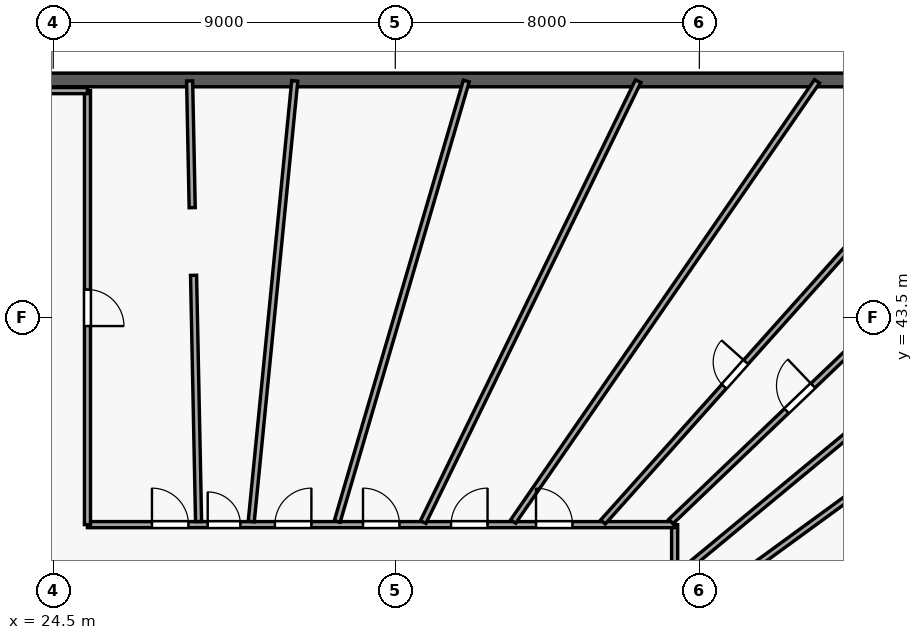
"""IFC4 building model, lengths in metres.
Left out: names, types, materials, properties, quantities, classifications, styles, units other than length and angle.
Written with IfcOpenShell. Run it as: python <this file> out.ifc"""

import sys

from ifc_helpers import new_model, si_unit, direction, frame, frame_2d, origin, origin_with_axes, origin_2d, place, context, subcontext, project, spatial, rectangle, circle, extrude, source, transform, mapped, element, fill, save


model = new_model("IFC4")
c1 = context("Model", 3, precision=1e-05, world=origin(), true_north=direction((0.0, 1.0)))
c2 = subcontext(c1, "Body", "Model", "MODEL_VIEW")
j1 = project(units=[si_unit("LENGTHUNIT", "METRE"), si_unit("PLANEANGLEUNIT", "RADIAN")], contexts=[c1])
p1 = place(None, origin())
s1 = spatial("IfcSite", under=j1, at=p1, CompositionType="ELEMENT")
p2 = place(p1, origin())
s2 = spatial("IfcBuilding", under=s1, at=p2, CompositionType="ELEMENT")
p3 = place(p2, frame((0.0, 0.0, 9.0)))
s3 = spatial("IfcBuildingStorey", under=s2, at=p3, CompositionType="ELEMENT", Elevation=9.0)
m1 = source(origin_with_axes(), c2, "Body", "SweptSolid", [
    extrude(circle(Radius=0.8, at=origin_2d()), origin(), (0.0, 0.0, 1.0), 4.5),
])
p4 = place(p3, frame((28.5, 45.5, 0.0), z_axis=(0.0, 0.0, 1.0), x_axis=(1.0, 0.0, 0.0)))
e1 = element("IfcColumn", 1, at=p4, inside=s3, PredefinedType="COLUMN", context=c2, shape_type="MappedRepresentation", body=[
    mapped(m1, transform((0.0, 0.0, 0.0), scale=1.0)),
])
p5 = place(p3, frame((54.6, 49.75, 0.0), z_axis=(0.0, 0.0, 1.0), x_axis=(-1.0, 0.0, 0.0)))
e2 = element("IfcWall", 2, at=p5, inside=s3, PredefinedType="SOLIDWALL", context=c2, shape_type="SweptSolid", body=[
    extrude(rectangle(XDim=49.25, YDim=0.36, at=frame_2d((24.625, 0.0))), origin(), (0.0, 0.0, 1.0), 4.2),
])
p6 = place(p5, frame((1.866, 0.0, 0.85)))
e3 = element("IfcOpeningElement", 3, at=p6, cuts=e2, PredefinedType="OPENING", context=c2, shape_type="SweptSolid", body=[
    extrude(rectangle(XDim=1.8, YDim=2.2, at=frame_2d((0.9, 1.1))), frame((0.0, 0.19, 0.0), z_axis=(0.0, -1.0, 0.0), x_axis=(1.0, 0.0, 0.0)), (0.0, 0.0, 1.0), 0.38),
])
p7 = place(p5, frame((6.763, 0.0, 0.85)))
e4 = element("IfcOpeningElement", 4, at=p7, cuts=e2, PredefinedType="OPENING", context=c2, shape_type="SweptSolid", body=[
    extrude(rectangle(XDim=1.8, YDim=2.2, at=frame_2d((0.9, 1.1))), frame((0.0, 0.19, 0.0), z_axis=(0.0, -1.0, 0.0), x_axis=(1.0, 0.0, 0.0)), (0.0, 0.0, 1.0), 0.38),
])
p8 = place(p5, frame((11.474, 0.0, 0.85)))
e5 = element("IfcOpeningElement", 5, at=p8, cuts=e2, PredefinedType="OPENING", context=c2, shape_type="SweptSolid", body=[
    extrude(rectangle(XDim=1.8, YDim=2.2, at=frame_2d((0.9, 1.1))), frame((0.0, 0.19, 0.0), z_axis=(0.0, -1.0, 0.0), x_axis=(1.0, 0.0, 0.0)), (0.0, 0.0, 1.0), 0.38),
])
p9 = place(p5, frame((16.083, 0.0, 0.85)))
e6 = element("IfcOpeningElement", 6, at=p9, cuts=e2, PredefinedType="OPENING", context=c2, shape_type="SweptSolid", body=[
    extrude(rectangle(XDim=1.8, YDim=2.2, at=frame_2d((0.9, 1.1))), frame((0.0, 0.19, 0.0), z_axis=(0.0, -1.0, 0.0), x_axis=(1.0, 0.0, 0.0)), (0.0, 0.0, 1.0), 0.38),
])
p10 = place(p5, frame((20.595, 0.0, 0.85)))
e7 = element("IfcOpeningElement", 7, at=p10, cuts=e2, PredefinedType="OPENING", context=c2, shape_type="SweptSolid", body=[
    extrude(rectangle(XDim=1.8, YDim=2.2, at=frame_2d((0.9, 1.1))), frame((0.0, 0.19, 0.0), z_axis=(0.0, -1.0, 0.0), x_axis=(1.0, 0.0, 0.0)), (0.0, 0.0, 1.0), 0.38),
])
p11 = place(p5, frame((24.23, 0.0, 0.85)))
e8 = element("IfcOpeningElement", 8, at=p11, cuts=e2, PredefinedType="OPENING", context=c2, shape_type="SweptSolid", body=[
    extrude(rectangle(XDim=1.8, YDim=2.2, at=frame_2d((0.9, 1.1))), frame((0.0, 0.19, 0.0), z_axis=(0.0, -1.0, 0.0), x_axis=(1.0, 0.0, 0.0)), (0.0, 0.0, 1.0), 0.38),
])
p12 = place(p5, frame((30.4, 0.0, 0.85)))
e9 = element("IfcOpeningElement", 9, at=p12, cuts=e2, PredefinedType="OPENING", context=c2, shape_type="SweptSolid", body=[
    extrude(rectangle(XDim=1.8, YDim=2.2, at=frame_2d((0.9, 1.1))), frame((0.0, 0.19, 0.0), z_axis=(0.0, -1.0, 0.0), x_axis=(1.0, 0.0, 0.0)), (0.0, 0.0, 1.0), 0.38),
])
p13 = place(p5, frame((35.42, 0.0, 0.85)))
e10 = element("IfcOpeningElement", 10, at=p13, cuts=e2, PredefinedType="OPENING", context=c2, shape_type="SweptSolid", body=[
    extrude(rectangle(XDim=1.8, YDim=2.2, at=frame_2d((0.9, 1.1))), frame((0.0, 0.19, 0.0), z_axis=(0.0, -1.0, 0.0), x_axis=(1.0, 0.0, 0.0)), (0.0, 0.0, 1.0), 0.38),
])
p14 = place(p5, frame((40.69, 0.0, 0.85)))
e11 = element("IfcOpeningElement", 11, at=p14, cuts=e2, PredefinedType="OPENING", context=c2, shape_type="SweptSolid", body=[
    extrude(rectangle(XDim=1.8, YDim=2.2, at=frame_2d((0.9, 1.1))), frame((0.0, 0.19, 0.0), z_axis=(0.0, -1.0, 0.0), x_axis=(1.0, 0.0, 0.0)), (0.0, 0.0, 1.0), 0.38),
])
p15 = place(p5, frame((45.58, 0.0, 0.85)))
e12 = element("IfcOpeningElement", 12, at=p15, cuts=e2, PredefinedType="OPENING", context=c2, shape_type="SweptSolid", body=[
    extrude(rectangle(XDim=1.8, YDim=2.2, at=frame_2d((0.9, 1.1))), frame((0.0, 0.19, 0.0), z_axis=(0.0, -1.0, 0.0), x_axis=(1.0, 0.0, 0.0)), (0.0, 0.0, 1.0), 0.38),
])
p16 = place(p3, frame((40.932, 36.712, 0.0), z_axis=(0.0, 0.0, 1.0), x_axis=(0.770350004389, 0.637621259635, 0.0)))
e13 = element("IfcWall", 13, at=p16, inside=s3, PredefinedType="PARTITIONING", context=c2, shape_type="SweptSolid", body=[
    extrude(rectangle(XDim=18.942, YDim=0.16, at=frame_2d((9.471, 0.0))), origin(), (0.0, 0.0, 1.0), 4.2),
])
p17 = place(p16, frame((8.979, 0.0, 0.0)))
e14 = element("IfcOpeningElement", 14, at=p17, cuts=e13, PredefinedType="OPENING", context=c2, shape_type="SweptSolid", body=[
    extrude(rectangle(XDim=0.96, YDim=2.15, at=frame_2d((0.48, 1.075))), frame((0.0, 0.09, 0.0), z_axis=(0.0, -1.0, 0.0), x_axis=(1.0, 0.0, 0.0)), (0.0, 0.0, 1.0), 0.18),
])
p18 = place(p3, frame((40.932, 35.49, 0.0), z_axis=(0.0, 0.0, 1.0), x_axis=(0.808014689356, 0.589162339076, 0.0)))
e15 = element("IfcWall", 15, at=p18, inside=s3, PredefinedType="PARTITIONING", context=c2, shape_type="SweptSolid", body=[
    extrude(rectangle(XDim=18.602, YDim=0.16, at=frame_2d((9.301, 0.0))), origin(), (0.0, 0.0, 1.0), 4.2),
])
p19 = place(p18, frame((8.808, 0.0, 0.0)))
e16 = element("IfcOpeningElement", 16, at=p19, cuts=e15, PredefinedType="OPENING", context=c2, shape_type="SweptSolid", body=[
    extrude(rectangle(XDim=0.96, YDim=2.15, at=frame_2d((0.48, 1.075))), frame((0.0, 0.09, 0.0), z_axis=(0.0, -1.0, 0.0), x_axis=(1.0, 0.0, 0.0)), (0.0, 0.0, 1.0), 0.18),
])
p20 = place(p3, frame((40.85, 38.05, 0.0), z_axis=(0.0, 0.0, 1.0), x_axis=(0.0, -1.0, 0.0)))
e17 = element("IfcWall", 17, at=p20, inside=s3, PredefinedType="PARTITIONING", context=c2, shape_type="SweptSolid", body=[
    extrude(rectangle(XDim=18.508, YDim=0.16, at=frame_2d((9.254, 0.0))), origin(), (0.0, 0.0, 1.0), 3.25),
])
p21 = place(p20, frame((13.87, 0.0, 0.0)))
e18 = element("IfcOpeningElement", 18, at=p21, cuts=e17, PredefinedType="OPENING", context=c2, shape_type="SweptSolid", body=[
    extrude(rectangle(XDim=0.96, YDim=2.15, at=frame_2d((0.48, 1.075))), frame((0.0, 0.09, 0.0), z_axis=(0.0, -1.0, 0.0), x_axis=(1.0, 0.0, 0.0)), (0.0, 0.0, 1.0), 0.18),
])
p22 = place(p20, frame((8.695, 0.0, 0.0)))
e19 = element("IfcOpeningElement", 19, at=p22, cuts=e17, PredefinedType="OPENING", context=c2, shape_type="SweptSolid", body=[
    extrude(rectangle(XDim=0.96, YDim=2.15, at=frame_2d((0.48, 1.075))), frame((0.0, 0.09, 0.0), z_axis=(0.0, -1.0, 0.0), x_axis=(1.0, 0.0, 0.0)), (0.0, 0.0, 1.0), 0.18),
])
p23 = place(p20, frame((6.334, 0.0, 0.0)))
e20 = element("IfcOpeningElement", 20, at=p23, cuts=e17, PredefinedType="OPENING", context=c2, shape_type="SweptSolid", body=[
    extrude(rectangle(XDim=0.96, YDim=2.15, at=frame_2d((0.48, 1.075))), frame((0.0, 0.09, 0.0), z_axis=(0.0, -1.0, 0.0), x_axis=(1.0, 0.0, 0.0)), (0.0, 0.0, 1.0), 0.18),
])
p24 = place(p20, frame((12.2, 0.0, 0.0)))
e21 = element("IfcOpeningElement", 21, at=p24, cuts=e17, PredefinedType="OPENING", context=c2, shape_type="SweptSolid", body=[
    extrude(rectangle(XDim=0.96, YDim=2.15, at=frame_2d((0.48, 1.075))), frame((0.0, 0.09, 0.0), z_axis=(0.0, -1.0, 0.0), x_axis=(1.0, 0.0, 0.0)), (0.0, 0.0, 1.0), 0.18),
])
p25 = place(p20, frame((2.76, 0.0, 0.0)))
e22 = element("IfcOpeningElement", 22, at=p25, cuts=e17, PredefinedType="OPENING", context=c2, shape_type="SweptSolid", body=[
    extrude(rectangle(XDim=0.86, YDim=2.04, at=frame_2d((0.43, 1.02))), frame((0.0, 0.09, 0.0), z_axis=(0.0, -1.0, 0.0), x_axis=(1.0, 0.0, 0.0)), (0.0, 0.0, 1.0), 0.18),
])
p26 = place(p20, frame((1.494, 0.0, 0.0)))
e23 = element("IfcOpeningElement", 23, at=p26, cuts=e17, PredefinedType="OPENING", context=c2, shape_type="SweptSolid", body=[
    extrude(rectangle(XDim=0.86, YDim=2.04, at=frame_2d((0.43, 1.02))), frame((0.0, 0.09, 0.0), z_axis=(0.0, -1.0, 0.0), x_axis=(1.0, 0.0, 0.0)), (0.0, 0.0, 1.0), 0.18),
])
p27 = place(p3, frame((40.919, 33.932, 0.0), z_axis=(0.0, 0.0, 1.0), x_axis=(0.855961001887, 0.517040388412, 0.0)))
e24 = element("IfcWall", 24, at=p27, inside=s3, PredefinedType="PARTITIONING", context=c2, shape_type="SweptSolid", body=[
    extrude(rectangle(XDim=17.579, YDim=0.16, at=frame_2d((8.789, 0.0))), origin(), (0.0, 0.0, 1.0), 4.2),
])
p28 = place(p27, frame((8.289, 0.0, 0.0)))
e25 = element("IfcOpeningElement", 25, at=p28, cuts=e24, PredefinedType="OPENING", context=c2, shape_type="SweptSolid", body=[
    extrude(rectangle(XDim=0.96, YDim=2.15, at=frame_2d((0.48, 1.075))), frame((0.0, 0.09, 0.0), z_axis=(0.0, -1.0, 0.0), x_axis=(1.0, 0.0, 0.0)), (0.0, 0.0, 1.0), 0.18),
])
p29 = place(p3, frame((40.919, 32.827, 0.0), z_axis=(0.0, 0.0, 1.0), x_axis=(0.8890624387, 0.457785954452, 0.0)))
e26 = element("IfcWall", 26, at=p29, inside=s3, PredefinedType="PARTITIONING", context=c2, shape_type="SweptSolid", body=[
    extrude(rectangle(XDim=16.927, YDim=0.16, at=frame_2d((8.464, 0.0))), origin(), (0.0, 0.0, 1.0), 4.2),
])
p30 = place(p29, frame((8.033, 0.0, 0.0)))
e27 = element("IfcOpeningElement", 27, at=p30, cuts=e26, PredefinedType="OPENING", context=c2, shape_type="SweptSolid", body=[
    extrude(rectangle(XDim=0.86, YDim=2.04, at=frame_2d((0.43, 1.02))), frame((0.0, 0.09, 0.0), z_axis=(0.0, -1.0, 0.0), x_axis=(1.0, 0.0, 0.0)), (0.0, 0.0, 1.0), 0.18),
])
p31 = place(p3, frame((40.932, 31.951, 0.0), z_axis=(0.0, 0.0, 1.0), x_axis=(0.914043329039, 0.405616558636, 0.0)))
e28 = element("IfcWall", 28, at=p31, inside=s3, PredefinedType="PARTITIONING", context=c2, shape_type="SweptSolid", body=[
    extrude(rectangle(XDim=16.452, YDim=0.16, at=frame_2d((8.226, 0.0))), origin(), (0.0, 0.0, 1.0), 4.2),
])
p32 = place(p31, frame((7.733, 0.0, 0.0)))
e29 = element("IfcOpeningElement", 29, at=p32, cuts=e28, PredefinedType="OPENING", context=c2, shape_type="SweptSolid", body=[
    extrude(rectangle(XDim=0.96, YDim=2.15, at=frame_2d((0.48, 1.075))), frame((0.0, 0.09, 0.0), z_axis=(0.0, -1.0, 0.0), x_axis=(1.0, 0.0, 0.0)), (0.0, 0.0, 1.0), 0.18),
])
p33 = place(p3, frame((25.4, 38.05, 0.0), z_axis=(0.0, 0.0, 1.0), x_axis=(1.0, 0.0, 0.0)))
e30 = element("IfcWall", 30, at=p33, inside=s3, PredefinedType="PARTITIONING", context=c2, shape_type="SweptSolid", body=[
    extrude(rectangle(XDim=15.45, YDim=0.16, at=frame_2d((7.725, 0.0))), origin(), (0.0, 0.0, 1.0), 4.2),
])
p34 = place(p33, frame((11.802, 0.0, 0.0)))
e31 = element("IfcOpeningElement", 31, at=p34, cuts=e30, PredefinedType="OPENING", context=c2, shape_type="SweptSolid", body=[
    extrude(rectangle(XDim=0.96, YDim=2.15, at=frame_2d((0.48, 1.075))), frame((0.0, 0.09, 0.0), z_axis=(0.0, -1.0, 0.0), x_axis=(1.0, 0.0, 0.0)), (0.0, 0.0, 1.0), 0.18),
])
p35 = place(p33, frame((9.567, 0.0, 0.0)))
e32 = element("IfcOpeningElement", 32, at=p35, cuts=e30, PredefinedType="OPENING", context=c2, shape_type="SweptSolid", body=[
    extrude(rectangle(XDim=0.96, YDim=2.15, at=frame_2d((0.48, 1.075))), frame((0.0, 0.09, 0.0), z_axis=(0.0, -1.0, 0.0), x_axis=(1.0, 0.0, 0.0)), (0.0, 0.0, 1.0), 0.18),
])
p36 = place(p33, frame((7.25, 0.0, 0.0)))
e33 = element("IfcOpeningElement", 33, at=p36, cuts=e30, PredefinedType="OPENING", context=c2, shape_type="SweptSolid", body=[
    extrude(rectangle(XDim=0.96, YDim=2.15, at=frame_2d((0.48, 1.075))), frame((0.0, 0.09, 0.0), z_axis=(0.0, -1.0, 0.0), x_axis=(1.0, 0.0, 0.0)), (0.0, 0.0, 1.0), 0.18),
])
p37 = place(p33, frame((4.933, 0.0, 0.0)))
e34 = element("IfcOpeningElement", 34, at=p37, cuts=e30, PredefinedType="OPENING", context=c2, shape_type="SweptSolid", body=[
    extrude(rectangle(XDim=0.96, YDim=2.15, at=frame_2d((0.48, 1.075))), frame((0.0, 0.09, 0.0), z_axis=(0.0, -1.0, 0.0), x_axis=(1.0, 0.0, 0.0)), (0.0, 0.0, 1.0), 0.18),
])
p38 = place(p33, frame((1.698, 0.0, 0.0)))
e35 = element("IfcOpeningElement", 35, at=p38, cuts=e30, PredefinedType="OPENING", context=c2, shape_type="SweptSolid", body=[
    extrude(rectangle(XDim=0.96, YDim=2.15, at=frame_2d((0.48, 1.075))), frame((0.0, 0.09, 0.0), z_axis=(0.0, -1.0, 0.0), x_axis=(1.0, 0.0, 0.0)), (0.0, 0.0, 1.0), 0.18),
])
p39 = place(p33, frame((3.164, 0.0, 0.0)))
e36 = element("IfcOpeningElement", 36, at=p39, cuts=e30, PredefinedType="OPENING", context=c2, shape_type="SweptSolid", body=[
    extrude(rectangle(XDim=0.86, YDim=2.04, at=frame_2d((0.43, 1.02))), frame((0.0, 0.09, 0.0), z_axis=(0.0, -1.0, 0.0), x_axis=(1.0, 0.0, 0.0)), (0.0, 0.0, 1.0), 0.18),
])
p40 = place(p3, frame((36.602, 38.132, 0.0), z_axis=(0.0, 0.0, 1.0), x_axis=(0.568083583137, 0.822970863743, 0.0)))
e37 = element("IfcWall", 37, at=p40, inside=s3, PredefinedType="PARTITIONING", context=c2, shape_type="SweptSolid", body=[
    extrude(rectangle(XDim=14.073, YDim=0.16, at=frame_2d((7.036, 0.0))), origin(), (0.0, 0.0, 1.0), 4.2),
])
p41 = place(p3, frame((34.233, 38.118, 0.0), z_axis=(0.0, 0.0, 1.0), x_axis=(0.438369218091, 0.898794986985, 0.0)))
e38 = element("IfcWall", 38, at=p41, inside=s3, PredefinedType="PARTITIONING", context=c2, shape_type="SweptSolid", body=[
    extrude(rectangle(XDim=12.906, YDim=0.16, at=frame_2d((6.453, 0.0))), origin(), (0.0, 0.0, 1.0), 4.2),
])
p42 = place(p3, frame((31.972, 38.132, 0.0), z_axis=(0.0, 0.0, 1.0), x_axis=(0.281237056868, 0.959638326582, 0.0)))
e39 = element("IfcWall", 39, at=p42, inside=s3, PredefinedType="PARTITIONING", context=c2, shape_type="SweptSolid", body=[
    extrude(rectangle(XDim=12.078, YDim=0.16, at=frame_2d((6.039, 0.0))), origin(), (0.0, 0.0, 1.0), 4.2),
])
p43 = place(p3, frame((29.709, 38.132, 0.0), z_axis=(0.0, 0.0, 1.0), x_axis=(0.098293881021, 0.995157431241, 0.0)))
e40 = element("IfcWall", 40, at=p43, inside=s3, PredefinedType="PARTITIONING", context=c2, shape_type="SweptSolid", body=[
    extrude(rectangle(XDim=11.649, YDim=0.16, at=frame_2d((5.824, 0.0))), origin(), (0.0, 0.0, 1.0), 4.2),
])
p44 = place(p3, frame((25.4, 49.47, 0.0), z_axis=(0.0, 0.0, 1.0), x_axis=(0.0, -1.0, 0.0)))
e41 = element("IfcWall", 41, at=p44, inside=s3, PredefinedType="PARTITIONING", context=c2, shape_type="SweptSolid", body=[
    extrude(rectangle(XDim=11.42, YDim=0.16, at=frame_2d((5.71, 0.0))), origin(), (0.0, 0.0, 1.0), 4.2),
])
p45 = place(p44, frame((5.235, 0.0, 0.0)))
e42 = element("IfcOpeningElement", 42, at=p45, cuts=e41, PredefinedType="OPENING", context=c2, shape_type="SweptSolid", body=[
    extrude(rectangle(XDim=0.96, YDim=2.15, at=frame_2d((0.48, 1.075))), frame((0.0, 0.09, 0.0), z_axis=(0.0, -1.0, 0.0), x_axis=(1.0, 0.0, 0.0)), (0.0, 0.0, 1.0), 0.18),
])
p46 = place(p3, frame((38.966, 38.121, 0.0), z_axis=(0.0, 0.0, 1.0), x_axis=(0.666343454818, 0.745644955875, 0.0)))
e43 = element("IfcWall", 43, at=p46, inside=s3, PredefinedType="PARTITIONING", context=c2, shape_type="SweptSolid", body=[
    extrude(rectangle(XDim=10.421, YDim=0.16, at=frame_2d((5.21, 0.0))), origin(), (0.0, 0.0, 1.0), 4.2),
])
p47 = place(p46, frame((4.781, 0.0, 0.0)))
e44 = element("IfcOpeningElement", 44, at=p47, cuts=e43, PredefinedType="OPENING", context=c2, shape_type="SweptSolid", body=[
    extrude(rectangle(XDim=0.86, YDim=2.04, at=frame_2d((0.43, 1.02))), frame((0.0, 0.09, 0.0), z_axis=(0.0, -1.0, 0.0), x_axis=(1.0, 0.0, 0.0)), (0.0, 0.0, 1.0), 0.18),
])
p48 = place(p3, frame((40.752, 38.132, 0.0), z_axis=(0.0, 0.0, 1.0), x_axis=(0.722765157253, 0.69109371829, 0.0)))
e45 = element("IfcWall", 45, at=p48, inside=s3, PredefinedType="PARTITIONING", context=c2, shape_type="SweptSolid", body=[
    extrude(rectangle(XDim=9.374, YDim=0.16, at=frame_2d((4.687, 0.0))), origin(), (0.0, 0.0, 1.0), 3.25),
])
p49 = place(p48, frame((4.212, 0.0, 0.0)))
e46 = element("IfcOpeningElement", 46, at=p49, cuts=e45, PredefinedType="OPENING", context=c2, shape_type="SweptSolid", body=[
    extrude(rectangle(XDim=0.96, YDim=2.15, at=frame_2d((0.48, 1.075))), frame((0.0, 0.09, 0.0), z_axis=(0.0, -1.0, 0.0), x_axis=(1.0, 0.0, 0.0)), (0.0, 0.0, 1.0), 0.18),
])
p50 = place(p3, frame((28.323, 38.132, 0.0), z_axis=(0.0, 0.0, 1.0), x_axis=(-0.020309370156, 0.999793743471, 0.0)))
e47 = element("IfcWall", 47, at=p50, inside=s3, PredefinedType="PARTITIONING", context=c2, shape_type="SweptSolid", body=[
    extrude(rectangle(XDim=6.479, YDim=0.16, at=frame_2d((3.24, 0.0))), origin(), (0.0, 0.0, 1.0), 3.25),
])
p51 = place(p3, frame((21.2, 49.47, 0.0), z_axis=(0.0, 0.0, 1.0), x_axis=(1.0, 0.0, 0.0)))
e48 = element("IfcWall", 48, at=p51, inside=s3, PredefinedType="PARTITIONING", context=c2, shape_type="SweptSolid", body=[
    extrude(rectangle(XDim=4.2, YDim=0.16, at=frame_2d((2.1, 0.0))), origin(), (0.0, 0.0, 1.0), 4.2),
])
p52 = place(p3, frame((28.156, 46.39, 0.0), z_axis=(0.0, 0.0, 1.0), x_axis=(-0.020345688852, 0.999793005049, 0.0)))
e49 = element("IfcWall", 49, at=p52, inside=s3, PredefinedType="PARTITIONING", context=c2, shape_type="SweptSolid", body=[
    extrude(rectangle(XDim=3.336, YDim=0.16, at=frame_2d((1.668, 0.0))), origin(), (0.0, 0.0, 1.0), 4.2),
])
m2 = source(origin_with_axes(), c2, "Body", "SweptSolid", [
    extrude(rectangle(XDim=1.8, YDim=2.2, at=frame_2d((0.9, 1.1))), frame((0.0, 0.03, 0.0), z_axis=(0.0, -1.0, 0.0), x_axis=(1.0, 0.0, 0.0)), (0.0, 0.0, 1.0), 0.06),
])
p53 = place(p8, origin())
e50 = element("IfcWindow", 50, at=p53, inside=s3, PartitioningType="SINGLE_PANEL", PredefinedType="WINDOW", context=c2, shape_type="MappedRepresentation", body=[
    mapped(m2, transform((0.0, 0.0, 0.0), scale=1.0)),
])
fill(e5, e50)
p54 = place(p9, origin())
e51 = element("IfcWindow", 51, at=p54, inside=s3, PartitioningType="SINGLE_PANEL", PredefinedType="WINDOW", context=c2, shape_type="MappedRepresentation", body=[
    mapped(m2, transform((0.0, 0.0, 0.0), scale=1.0)),
])
fill(e6, e51)
p55 = place(p10, origin())
e52 = element("IfcWindow", 52, at=p55, inside=s3, PartitioningType="SINGLE_PANEL", PredefinedType="WINDOW", context=c2, shape_type="MappedRepresentation", body=[
    mapped(m2, transform((0.0, 0.0, 0.0), scale=1.0)),
])
fill(e7, e52)
p56 = place(p11, origin())
e53 = element("IfcWindow", 53, at=p56, inside=s3, PartitioningType="SINGLE_PANEL", PredefinedType="WINDOW", context=c2, shape_type="MappedRepresentation", body=[
    mapped(m2, transform((0.0, 0.0, 0.0), scale=1.0)),
])
fill(e8, e53)
m3 = source(origin_with_axes(), c2, "Body", "SweptSolid", [
    extrude(rectangle(XDim=0.96, YDim=2.15, at=frame_2d((0.48, 1.075))), frame((0.0, 0.025, 0.0), z_axis=(0.0, -1.0, 0.0), x_axis=(1.0, 0.0, 0.0)), (0.0, 0.0, 1.0), 0.05),
])
p57 = place(p49, origin())
e54 = element("IfcDoor", 54, at=p57, inside=s3, OperationType="SINGLE_SWING_RIGHT", PredefinedType="DOOR", context=c2, shape_type="MappedRepresentation", body=[
    mapped(m3, transform((0.0, 0.0, 0.0), scale=1.0)),
])
fill(e46, e54)
p58 = place(p34, origin())
e55 = element("IfcDoor", 55, at=p58, inside=s3, OperationType="SINGLE_SWING_LEFT", PredefinedType="DOOR", context=c2, shape_type="MappedRepresentation", body=[
    mapped(m3, transform((0.0, 0.0, 0.0), scale=1.0)),
])
fill(e31, e55)
p59 = place(p35, origin())
e56 = element("IfcDoor", 56, at=p59, inside=s3, OperationType="SINGLE_SWING_RIGHT", PredefinedType="DOOR", context=c2, shape_type="MappedRepresentation", body=[
    mapped(m3, transform((0.0, 0.0, 0.0), scale=1.0)),
])
fill(e32, e56)
p60 = place(p36, origin())
e57 = element("IfcDoor", 57, at=p60, inside=s3, OperationType="SINGLE_SWING_LEFT", PredefinedType="DOOR", context=c2, shape_type="MappedRepresentation", body=[
    mapped(m3, transform((0.0, 0.0, 0.0), scale=1.0)),
])
fill(e33, e57)
p61 = place(p37, origin())
e58 = element("IfcDoor", 58, at=p61, inside=s3, OperationType="SINGLE_SWING_RIGHT", PredefinedType="DOOR", context=c2, shape_type="MappedRepresentation", body=[
    mapped(m3, transform((0.0, 0.0, 0.0), scale=1.0)),
])
fill(e34, e58)
p62 = place(p38, origin())
e59 = element("IfcDoor", 59, at=p62, inside=s3, OperationType="SINGLE_SWING_LEFT", PredefinedType="DOOR", context=c2, shape_type="MappedRepresentation", body=[
    mapped(m3, transform((0.0, 0.0, 0.0), scale=1.0)),
])
fill(e35, e59)
p63 = place(p45, origin())
e60 = element("IfcDoor", 60, at=p63, inside=s3, OperationType="SINGLE_SWING_RIGHT", PredefinedType="DOOR", context=c2, shape_type="MappedRepresentation", body=[
    mapped(m3, transform((0.0, 0.0, 0.0), scale=1.0)),
])
fill(e42, e60)
m4 = source(origin_with_axes(), c2, "Body", "SweptSolid", [
    extrude(rectangle(XDim=0.86, YDim=2.04, at=frame_2d((0.43, 1.02))), frame((0.0, 0.025, 0.0), z_axis=(0.0, -1.0, 0.0), x_axis=(1.0, 0.0, 0.0)), (0.0, 0.0, 1.0), 0.05),
])
p64 = place(p47, origin())
e61 = element("IfcDoor", 61, at=p64, inside=s3, OperationType="SINGLE_SWING_RIGHT", PredefinedType="DOOR", context=c2, shape_type="MappedRepresentation", body=[
    mapped(m4, transform((0.0, 0.0, 0.0), scale=1.0)),
])
fill(e44, e61)
p65 = place(p39, origin())
e62 = element("IfcDoor", 62, at=p65, inside=s3, OperationType="SINGLE_SWING_LEFT", PredefinedType="DOOR", context=c2, shape_type="MappedRepresentation", body=[
    mapped(m4, transform((0.0, 0.0, 0.0), scale=1.0)),
])
fill(e36, e62)
save(model, sys.argv[1])
